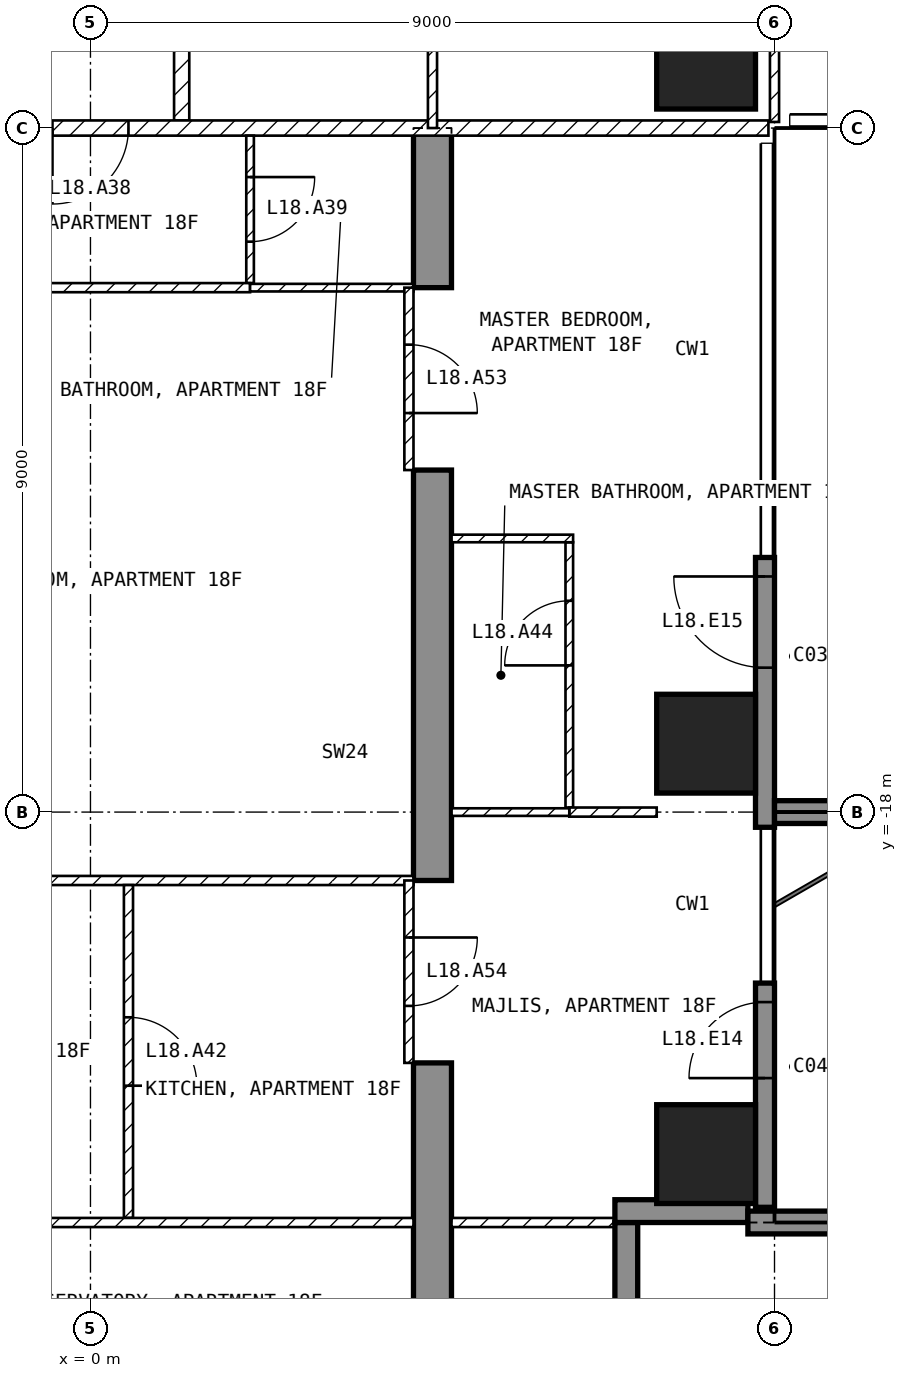
"""IFC4 building model, lengths in metres.
Left out: names, types, materials, properties, quantities, classifications, styles, units other than length and angle.
Written with IfcOpenShell. Run it as: python <this file> out.ifc"""

import sys

from ifc_helpers import new_model, si_unit, direction, frame, frame_2d, origin, origin_2d, place, context, subcontext, project, spatial, polyline, rectangle, outline, extrude, element, fill, save


model = new_model("IFC4")
c1 = context("Model", 3, precision=1e-05, world=origin(), true_north=direction((0.0, 1.0)))
c2 = subcontext(c1, "Body", "Model", "MODEL_VIEW")
j1 = project(units=[si_unit("LENGTHUNIT", "METRE"), si_unit("PLANEANGLEUNIT", "RADIAN")], contexts=[c1])
p1 = place(None, origin())
s1 = spatial("IfcSite", under=j1, at=p1, CompositionType="ELEMENT")
p2 = place(p1, origin())
s2 = spatial("IfcBuilding", under=s1, at=p2, CompositionType="ELEMENT")
p3 = place(p2, frame((0.0, 0.0, 82.0)))
s3 = spatial("IfcBuildingStorey", under=s2, at=p3, CompositionType="ELEMENT", Elevation=82.0)
for number, where, z_axis, x_axis in (
    (1, (8.1, -22.5, -0.25), (0.0, 0.0, 1.0), (1.0, 0.0, 0.0)),
    (2, (8.1, -17.1, -0.25), (0.0, 0.0, 1.0), (1.0, 0.0, 0.0)),
    (3, (8.1, -8.1, -0.25), (0.0, 0.0, 1.0), (1.0, 0.0, 0.0)),
):
    element("IfcColumn", number, at=place(p3, frame(where, z_axis=z_axis, x_axis=x_axis)), inside=s3, PredefinedType="COLUMN", context=c2, shape_type="SweptSolid", body=[
        extrude(rectangle(XDim=1.3, YDim=1.3, at=origin_2d()), origin(), (0.0, 0.0, 1.0), 3.5),
    ])
p4 = place(p3, frame((4.25, -25.45, -0.25), z_axis=(1.0, 0.0, 0.0), x_axis=(0.0, 1.0, 0.0)))
e4 = element("IfcWall", 4, at=p4, inside=s3, PredefinedType="SHEAR", context=c2, shape_type="SweptSolid", body=[
    extrude(outline(polyline([(0.0, 0.0), (4.15, 0.0), (4.15, 2.65), (6.55, 2.65), (6.55, 0.0), (11.95, 0.0), (11.95, 2.65), (14.35, 2.65), (14.35, 0.0), (16.45, 0.0), (16.45, 3.5), (0.0, 3.5), (0.0, 0.0)])), origin(), (0.0, 0.0, 1.0), 0.5),
])
p5 = place(p3, frame((8.875, -23.2, 0.0), z_axis=(0.0, 0.0, 1.0), x_axis=(0.0, 1.0, 0.0)))
e5 = element("IfcWall", 5, at=p5, inside=s3, PredefinedType="SOLIDWALL", context=c2, shape_type="SweptSolid", body=[
    extrude(rectangle(XDim=2.95, YDim=0.25, at=frame_2d((1.475, 0.0))), origin(), (0.0, 0.0, 1.0), 3.25),
])
p6 = place(p5, frame((1.7, 0.0, 0.0)))
e6 = element("IfcOpeningElement", 6, at=p6, cuts=e5, PredefinedType="OPENING", context=c2, shape_type="SweptSolid", body=[
    extrude(rectangle(XDim=1.0, YDim=2.4, at=frame_2d((0.5, 1.2))), frame((0.0, 0.135, 0.0), z_axis=(0.0, -1.0, 0.0), x_axis=(1.0, 0.0, 0.0)), (0.0, 0.0, 1.0), 0.27),
])
p7 = place(p3, frame((8.875, -18.2, 0.0), z_axis=(0.0, 0.0, 1.0), x_axis=(0.0, 1.0, 0.0)))
e7 = element("IfcWall", 7, at=p7, inside=s3, PredefinedType="SOLIDWALL", context=c2, shape_type="SweptSolid", body=[
    extrude(rectangle(XDim=3.55, YDim=0.25, at=frame_2d((1.775, 0.0))), origin(), (0.0, 0.0, 1.0), 3.25),
])
p8 = place(p7, frame((2.1, 0.0, 0.0)))
e8 = element("IfcOpeningElement", 8, at=p8, cuts=e7, PredefinedType="OPENING", context=c2, shape_type="SweptSolid", body=[
    extrude(rectangle(XDim=1.2, YDim=2.4, at=frame_2d((0.6, 1.2))), frame((0.0, 0.135, 0.0), z_axis=(0.0, -1.0, 0.0), x_axis=(1.0, 0.0, 0.0)), (0.0, 0.0, 1.0), 0.27),
])
p9 = place(p3, frame((7.05, -25.2, 0.0), z_axis=(0.0, 0.0, 1.0), x_axis=(0.0, 1.0, 0.0)))
e9 = element("IfcWall", 9, at=p9, inside=s3, PredefinedType="SOLIDWALL", context=c2, shape_type="SweptSolid", body=[
    extrude(rectangle(XDim=1.8, YDim=0.3, at=frame_2d((0.9, 0.0))), origin(), (0.0, 0.0, 1.0), 3.25),
])
p10 = place(p3, frame((6.9, -23.25, 0.0), z_axis=(0.0, 0.0, 1.0), x_axis=(1.0, 0.0, 0.0)))
e10 = element("IfcWall", 10, at=p10, inside=s3, PredefinedType="SOLIDWALL", context=c2, shape_type="SweptSolid", body=[
    extrude(rectangle(XDim=1.75, YDim=0.3, at=frame_2d((0.875, 0.0))), origin(), (0.0, 0.0, 1.0), 3.25),
])
p11 = place(p3, frame((8.65, -23.4, 0.0), z_axis=(0.0, 0.0, 1.0), x_axis=(1.0, 0.0, 0.0)))
e11 = element("IfcWall", 11, at=p11, inside=s3, PredefinedType="SOLIDWALL", context=c2, shape_type="SweptSolid", body=[
    extrude(rectangle(XDim=3.05, YDim=0.3, at=frame_2d((1.525, 0.0))), origin(), (0.0, 0.0, 1.0), 3.25),
])
p12 = place(p3, frame((9.0, -18.0, 0.0), z_axis=(0.0, 0.0, 1.0), x_axis=(1.0, 0.0, 0.0)))
e12 = element("IfcWall", 12, at=p12, inside=s3, PredefinedType="SOLIDWALL", context=c2, shape_type="SweptSolid", body=[
    extrude(rectangle(XDim=2.7, YDim=0.3, at=frame_2d((1.35, 0.0))), origin(), (0.0, 0.0, 1.0), 3.25),
])
p13 = place(p3, frame((1.2, -1.3, 0.0), z_axis=(0.0, 0.0, 1.0), x_axis=(0.0, -1.0, 0.0)))
e13 = element("IfcWall", 13, at=p13, inside=s3, PredefinedType="PARTITIONING", context=c2, shape_type="SweptSolid", body=[
    extrude(rectangle(XDim=7.6, YDim=0.2, at=frame_2d((3.8, 0.0))), origin(), (0.0, 0.0, 1.0), 3.25),
])
p14 = place(p3, frame((8.92, -9.0, 0.0), z_axis=(0.0, 0.0, 1.0), x_axis=(-1.0, 0.0, 0.0)))
e14 = element("IfcWall", 14, at=p14, inside=s3, PredefinedType="PARTITIONING", context=c2, shape_type="SweptSolid", body=[
    extrude(rectangle(XDim=17.84, YDim=0.2, at=frame_2d((8.92, 0.0))), origin(), (0.0, 0.0, 1.0), 3.25),
])
p15 = place(p14, frame((8.42, 0.0, 0.0)))
e15 = element("IfcOpeningElement", 15, at=p15, cuts=e14, PredefinedType="OPENING", context=c2, shape_type="SweptSolid", body=[
    extrude(rectangle(XDim=1.0, YDim=2.1, at=frame_2d((0.5, 1.05))), frame((0.0, 0.11, 0.0), z_axis=(0.0, -1.0, 0.0), x_axis=(1.0, 0.0, 0.0)), (0.0, 0.0, 1.0), 0.22),
])
p16 = place(p3, frame((9.0, -8.92, 0.0), z_axis=(0.0, 0.0, 1.0), x_axis=(0.0, 1.0, 0.0)))
e16 = element("IfcWall", 16, at=p16, inside=s3, PredefinedType="PARTITIONING", context=c2, shape_type="SweptSolid", body=[
    extrude(rectangle(XDim=7.62, YDim=0.12, at=frame_2d((3.81, 0.0))), origin(), (0.0, 0.0, 1.0), 3.25),
])
p17 = place(p16, frame((2.67, 0.0, 0.0)))
e17 = element("IfcOpeningElement", 17, at=p17, cuts=e16, PredefinedType="OPENING", context=c2, shape_type="SweptSolid", body=[
    extrude(rectangle(XDim=0.9, YDim=2.1, at=frame_2d((0.45, 1.05))), frame((0.0, 0.07, 0.0), z_axis=(0.0, -1.0, 0.0), x_axis=(1.0, 0.0, 0.0)), (0.0, 0.0, 1.0), 0.14),
])
p18 = place(p3, frame((4.5, -9.0, 0.0), z_axis=(0.0, 0.0, 1.0), x_axis=(0.0, 1.0, 0.0)))
e18 = element("IfcWall", 18, at=p18, inside=s3, PredefinedType="PARTITIONING", context=c2, shape_type="SweptSolid", body=[
    extrude(rectangle(XDim=3.9, YDim=0.12, at=frame_2d((1.95, 0.0))), origin(), (0.0, 0.0, 1.0), 3.25),
])
p19 = place(p18, frame((1.5, 0.0, 0.0)))
e19 = element("IfcOpeningElement", 19, at=p19, cuts=e18, PredefinedType="OPENING", context=c2, shape_type="SweptSolid", body=[
    extrude(rectangle(XDim=0.9, YDim=2.1, at=frame_2d((0.45, 1.05))), frame((0.0, 0.07, 0.0), z_axis=(0.0, -1.0, 0.0), x_axis=(1.0, 0.0, 0.0)), (0.0, 0.0, 1.0), 0.14),
])
p20 = place(p3, frame((2.1, -9.1, 0.0), z_axis=(0.0, 0.0, 1.0), x_axis=(0.0, -1.0, 0.0)))
e20 = element("IfcWall", 20, at=p20, inside=s3, PredefinedType="PARTITIONING", context=c2, shape_type="SweptSolid", body=[
    extrude(rectangle(XDim=1.94, YDim=0.1, at=frame_2d((0.97, 0.0))), origin(), (0.0, 0.0, 1.0), 3.25),
])
p21 = place(p20, frame((0.545, 0.0, 0.0)))
e21 = element("IfcOpeningElement", 21, at=p21, cuts=e20, PredefinedType="OPENING", context=c2, shape_type="SweptSolid", body=[
    extrude(rectangle(XDim=0.85, YDim=2.1, at=frame_2d((0.425, 1.05))), frame((0.0, 0.06, 0.0), z_axis=(0.0, -1.0, 0.0), x_axis=(1.0, 0.0, 0.0)), (0.0, 0.0, 1.0), 0.12),
])
p22 = place(p3, frame((2.1, -11.1, 0.0), z_axis=(0.0, 0.0, 1.0), x_axis=(-1.0, 0.0, 0.0)))
e22 = element("IfcWall", 22, at=p22, inside=s3, PredefinedType="PARTITIONING", context=c2, shape_type="SweptSolid", body=[
    extrude(rectangle(XDim=6.35, YDim=0.12, at=frame_2d((3.175, 0.0))), origin(), (0.0, 0.0, 1.0), 3.25),
])
p23 = place(p22, frame((2.725, 0.0, 0.0)))
e23 = element("IfcOpeningElement", 23, at=p23, cuts=e22, PredefinedType="OPENING", context=c2, shape_type="SweptSolid", body=[
    extrude(rectangle(XDim=0.9, YDim=2.1, at=frame_2d((0.45, 1.05))), frame((0.0, 0.07, 0.0), z_axis=(0.0, -1.0, 0.0), x_axis=(1.0, 0.0, 0.0)), (0.0, 0.0, 1.0), 0.14),
])
p24 = place(p3, frame((4.25, -11.1, 0.0), z_axis=(0.0, 0.0, 1.0), x_axis=(-1.0, 0.0, 0.0)))
e24 = element("IfcWall", 24, at=p24, inside=s3, PredefinedType="PARTITIONING", context=c2, shape_type="SweptSolid", body=[
    extrude(rectangle(XDim=2.15, YDim=0.1, at=frame_2d((1.075, 0.0))), origin(), (0.0, 0.0, 1.0), 3.25),
])
p25 = place(p3, frame((4.25, -18.9, 0.0), z_axis=(0.0, 0.0, 1.0), x_axis=(-1.0, 0.0, 0.0)))
e25 = element("IfcWall", 25, at=p25, inside=s3, PredefinedType="PARTITIONING", context=c2, shape_type="SweptSolid", body=[
    extrude(rectangle(XDim=8.5, YDim=0.12, at=frame_2d((4.25, 0.0))), origin(), (0.0, 0.0, 1.0), 3.25),
])
p26 = place(p25, frame((5.675, 0.0, 0.0)))
e26 = element("IfcOpeningElement", 26, at=p26, cuts=e25, PredefinedType="OPENING", context=c2, shape_type="SweptSolid", body=[
    extrude(rectangle(XDim=0.9, YDim=2.1, at=frame_2d((0.45, 1.05))), frame((0.0, 0.07, 0.0), z_axis=(0.0, -1.0, 0.0), x_axis=(1.0, 0.0, 0.0)), (0.0, 0.0, 1.0), 0.14),
])
p27 = place(p3, frame((0.5, -18.96, 0.0), z_axis=(0.0, 0.0, 1.0), x_axis=(0.0, -1.0, 0.0)))
e27 = element("IfcWall", 27, at=p27, inside=s3, PredefinedType="PARTITIONING", context=c2, shape_type="SweptSolid", body=[
    extrude(rectangle(XDim=4.38, YDim=0.12, at=frame_2d((2.19, 0.0))), origin(), (0.0, 0.0, 1.0), 3.25),
])
p28 = place(p27, frame((1.74, 0.0, 0.0)))
e28 = element("IfcOpeningElement", 28, at=p28, cuts=e27, PredefinedType="OPENING", context=c2, shape_type="SweptSolid", body=[
    extrude(rectangle(XDim=0.9, YDim=2.1, at=frame_2d((0.45, 1.05))), frame((0.0, 0.07, 0.0), z_axis=(0.0, -1.0, 0.0), x_axis=(1.0, 0.0, 0.0)), (0.0, 0.0, 1.0), 0.14),
])
p29 = place(p3, frame((4.25, -23.4, 0.0), z_axis=(0.0, 0.0, 1.0), x_axis=(-1.0, 0.0, 0.0)))
e29 = element("IfcWall", 29, at=p29, inside=s3, PredefinedType="PARTITIONING", context=c2, shape_type="SweptSolid", body=[
    extrude(rectangle(XDim=8.5, YDim=0.12, at=frame_2d((4.25, 0.0))), origin(), (0.0, 0.0, 1.0), 3.25),
])
p30 = place(p29, frame((5.675, 0.0, 0.0)))
e30 = element("IfcOpeningElement", 30, at=p30, cuts=e29, PredefinedType="OPENING", context=c2, shape_type="SweptSolid", body=[
    extrude(rectangle(XDim=0.9, YDim=2.1, at=frame_2d((0.45, 1.05))), frame((0.0, 0.07, 0.0), z_axis=(0.0, -1.0, 0.0), x_axis=(1.0, 0.0, 0.0)), (0.0, 0.0, 1.0), 0.14),
])
p31 = place(p3, frame((6.3, -17.94, 0.0), z_axis=(0.0, 0.0, 1.0), x_axis=(0.0, 1.0, 0.0)))
e31 = element("IfcWall", 31, at=p31, inside=s3, PredefinedType="PARTITIONING", context=c2, shape_type="SweptSolid", body=[
    extrude(rectangle(XDim=3.49, YDim=0.1, at=frame_2d((1.745, 0.0))), origin(), (0.0, 0.0, 1.0), 3.25),
])
p32 = place(p31, frame((1.87, 0.0, 0.0)))
e32 = element("IfcOpeningElement", 32, at=p32, cuts=e31, PredefinedType="OPENING", context=c2, shape_type="SweptSolid", body=[
    extrude(rectangle(XDim=0.85, YDim=2.1, at=frame_2d((0.425, 1.05))), frame((0.0, 0.06, 0.0), z_axis=(0.0, -1.0, 0.0), x_axis=(1.0, 0.0, 0.0)), (0.0, 0.0, 1.0), 0.12),
])
p33 = place(p3, frame((6.35, -14.4, 0.0), z_axis=(0.0, 0.0, 1.0), x_axis=(-1.0, 0.0, 0.0)))
e33 = element("IfcWall", 33, at=p33, inside=s3, PredefinedType="PARTITIONING", context=c2, shape_type="SweptSolid", body=[
    extrude(rectangle(XDim=1.6, YDim=0.1, at=frame_2d((0.8, 0.0))), origin(), (0.0, 0.0, 1.0), 3.25),
])
p34 = place(p3, frame((7.45, -18.0, 0.0), z_axis=(0.0, 0.0, 1.0), x_axis=(-1.0, 0.0, 0.0)))
e34 = element("IfcWall", 34, at=p34, inside=s3, PredefinedType="PARTITIONING", context=c2, shape_type="SweptSolid", body=[
    extrude(rectangle(XDim=1.15, YDim=0.12, at=frame_2d((0.575, 0.0))), origin(), (0.0, 0.0, 1.0), 3.25),
])
p35 = place(p3, frame((6.3, -18.0, 0.0), z_axis=(0.0, 0.0, 1.0), x_axis=(-1.0, 0.0, 0.0)))
e35 = element("IfcWall", 35, at=p35, inside=s3, PredefinedType="PARTITIONING", context=c2, shape_type="SweptSolid", body=[
    extrude(rectangle(XDim=1.55, YDim=0.1, at=frame_2d((0.775, 0.0))), origin(), (0.0, 0.0, 1.0), 3.25),
])
p36 = place(p3, frame((7.12, -23.4, 0.0), z_axis=(0.0, 0.0, 1.0), x_axis=(-1.0, 0.0, 0.0)))
e36 = element("IfcWall", 36, at=p36, inside=s3, PredefinedType="PARTITIONING", context=c2, shape_type="SweptSolid", body=[
    extrude(rectangle(XDim=2.37, YDim=0.12, at=frame_2d((1.185, 0.0))), origin(), (0.0, 0.0, 1.0), 3.25),
])
p37 = place(p3, frame((4.19, -11.1, 0.0), z_axis=(0.0, 0.0, 1.0), x_axis=(0.0, -1.0, 0.0)))
e37 = element("IfcWall", 37, at=p37, inside=s3, PredefinedType="PARTITIONING", context=c2, shape_type="SweptSolid", body=[
    extrude(rectangle(XDim=2.4, YDim=0.12, at=frame_2d((1.2, 0.0))), origin(), (0.0, 0.0, 1.0), 2.4),
])
p38 = place(p37, frame((0.75, 0.0, 0.0)))
e38 = element("IfcOpeningElement", 38, at=p38, cuts=e37, PredefinedType="OPENING", context=c2, shape_type="SweptSolid", body=[
    extrude(rectangle(XDim=0.9, YDim=2.1, at=frame_2d((0.45, 1.05))), frame((0.0, 0.07, 0.0), z_axis=(0.0, -1.0, 0.0), x_axis=(1.0, 0.0, 0.0)), (0.0, 0.0, 1.0), 0.14),
])
p39 = place(p3, frame((4.19, -18.9, 0.0), z_axis=(0.0, 0.0, 1.0), x_axis=(0.0, -1.0, 0.0)))
e39 = element("IfcWall", 39, at=p39, inside=s3, PredefinedType="PARTITIONING", context=c2, shape_type="SweptSolid", body=[
    extrude(rectangle(XDim=2.4, YDim=0.12, at=frame_2d((1.2, 0.0))), origin(), (0.0, 0.0, 1.0), 2.4),
])
p40 = place(p39, frame((0.75, 0.0, 0.0)))
e40 = element("IfcOpeningElement", 40, at=p40, cuts=e39, PredefinedType="OPENING", context=c2, shape_type="SweptSolid", body=[
    extrude(rectangle(XDim=0.9, YDim=2.1, at=frame_2d((0.45, 1.05))), frame((0.0, 0.07, 0.0), z_axis=(0.0, -1.0, 0.0), x_axis=(1.0, 0.0, 0.0)), (0.0, 0.0, 1.0), 0.14),
])
p41 = place(p6, origin())
e41 = element("IfcDoor", 41, at=p41, inside=s3, OperationType="SINGLE_SWING_LEFT", PredefinedType="DOOR", context=c2, shape_type="SweptSolid", body=[
    extrude(rectangle(XDim=1.0, YDim=2.4, at=frame_2d((0.5, 1.2))), frame((0.0, 0.025, 0.0), z_axis=(0.0, -1.0, 0.0), x_axis=(1.0, 0.0, 0.0)), (0.0, 0.0, 1.0), 0.05),
])
fill(e6, e41)
p42 = place(p8, origin())
e42 = element("IfcDoor", 42, at=p42, inside=s3, OperationType="SINGLE_SWING_RIGHT", PredefinedType="DOOR", context=c2, shape_type="SweptSolid", body=[
    extrude(rectangle(XDim=1.2, YDim=2.4, at=frame_2d((0.6, 1.2))), frame((0.0, 0.025, 0.0), z_axis=(0.0, -1.0, 0.0), x_axis=(1.0, 0.0, 0.0)), (0.0, 0.0, 1.0), 0.05),
])
fill(e8, e42)
p43 = place(p15, origin())
e43 = element("IfcDoor", 43, at=p43, inside=s3, OperationType="SINGLE_SWING_RIGHT", PredefinedType="DOOR", context=c2, shape_type="SweptSolid", body=[
    extrude(rectangle(XDim=1.0, YDim=2.1, at=frame_2d((0.5, 1.05))), frame((0.0, 0.025, 0.0), z_axis=(0.0, -1.0, 0.0), x_axis=(1.0, 0.0, 0.0)), (0.0, 0.0, 1.0), 0.05),
])
fill(e15, e43)
p44 = place(p21, origin())
e44 = element("IfcDoor", 44, at=p44, inside=s3, OperationType="SINGLE_SWING_LEFT", PredefinedType="DOOR", context=c2, shape_type="SweptSolid", body=[
    extrude(rectangle(XDim=0.85, YDim=2.1, at=frame_2d((0.425, 1.05))), frame((0.0, 0.025, 0.0), z_axis=(0.0, -1.0, 0.0), x_axis=(1.0, 0.0, 0.0)), (0.0, 0.0, 1.0), 0.05),
])
fill(e21, e44)
p45 = place(p28, origin())
e45 = element("IfcDoor", 45, at=p45, inside=s3, OperationType="SINGLE_SWING_RIGHT", PredefinedType="DOOR", context=c2, shape_type="SweptSolid", body=[
    extrude(rectangle(XDim=0.9, YDim=2.1, at=frame_2d((0.45, 1.05))), frame((0.0, 0.025, 0.0), z_axis=(0.0, -1.0, 0.0), x_axis=(1.0, 0.0, 0.0)), (0.0, 0.0, 1.0), 0.05),
])
fill(e28, e45)
p46 = place(p32, origin())
e46 = element("IfcDoor", 46, at=p46, inside=s3, OperationType="SINGLE_SWING_LEFT", PredefinedType="DOOR", context=c2, shape_type="SweptSolid", body=[
    extrude(rectangle(XDim=0.85, YDim=2.1, at=frame_2d((0.425, 1.05))), frame((0.0, 0.025, 0.0), z_axis=(0.0, -1.0, 0.0), x_axis=(1.0, 0.0, 0.0)), (0.0, 0.0, 1.0), 0.05),
])
fill(e32, e46)
p47 = place(p38, origin())
e47 = element("IfcDoor", 47, at=p47, inside=s3, OperationType="SINGLE_SWING_RIGHT", PredefinedType="DOOR", context=c2, shape_type="SweptSolid", body=[
    extrude(rectangle(XDim=0.9, YDim=2.1, at=frame_2d((0.45, 1.05))), frame((0.0, 0.025, 0.0), z_axis=(0.0, -1.0, 0.0), x_axis=(1.0, 0.0, 0.0)), (0.0, 0.0, 1.0), 0.05),
])
fill(e38, e47)
p48 = place(p40, origin())
e48 = element("IfcDoor", 48, at=p48, inside=s3, OperationType="SINGLE_SWING_LEFT", PredefinedType="DOOR", context=c2, shape_type="SweptSolid", body=[
    extrude(rectangle(XDim=0.9, YDim=2.1, at=frame_2d((0.45, 1.05))), frame((0.0, 0.025, 0.0), z_axis=(0.0, -1.0, 0.0), x_axis=(1.0, 0.0, 0.0)), (0.0, 0.0, 1.0), 0.05),
])
fill(e40, e48)
save(model, sys.argv[1])
